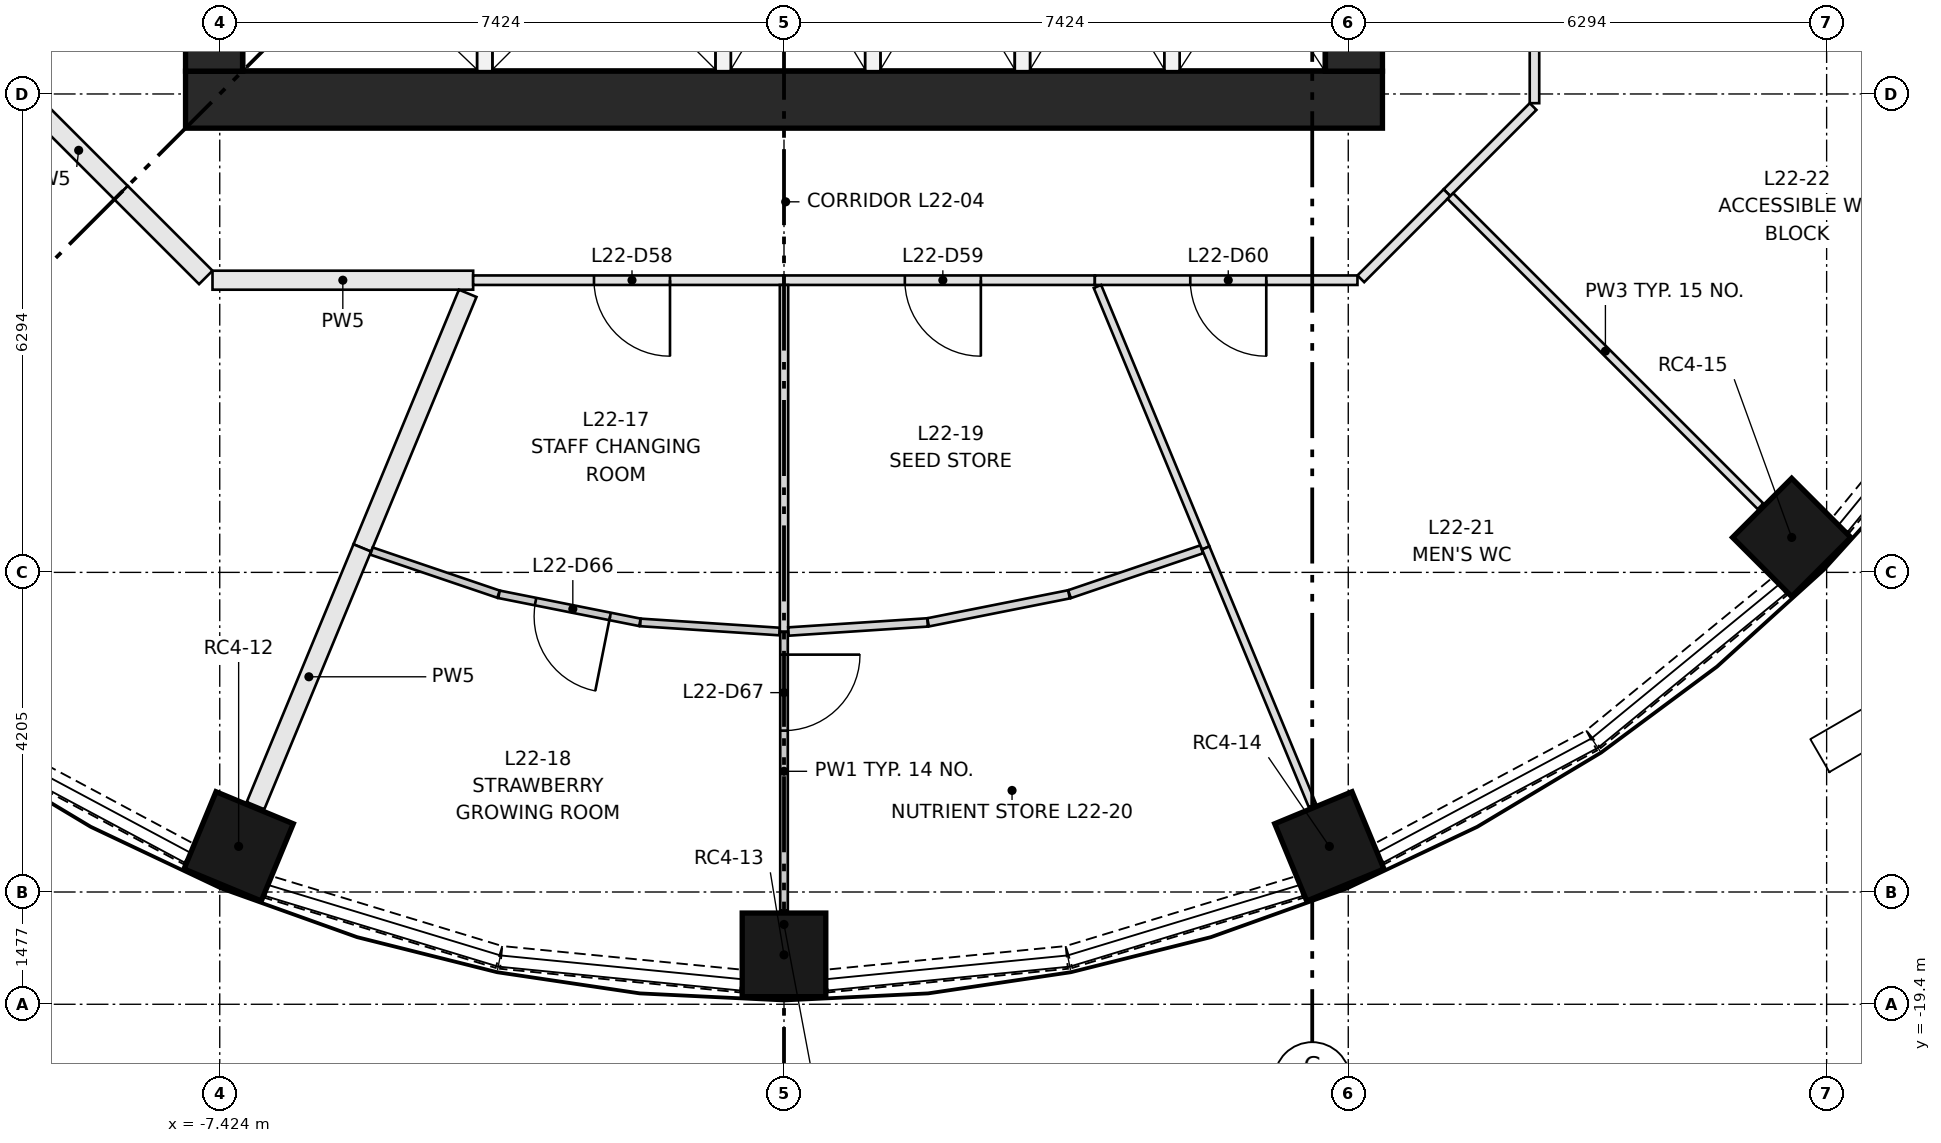
"""IFC4 building model, lengths in metres.
Left out: names, types, materials, properties, quantities, classifications, styles, units other than length and angle.
Written with IfcOpenShell. Run it as: python <this file> out.ifc"""

import sys

from ifc_helpers import new_model, si_unit, direction, frame, frame_2d, origin, origin_2d, place, context, subcontext, project, spatial, rectangle, extrude, element, fill, save


model = new_model("IFC4")
c1 = context("Model", 3, precision=1e-05, world=origin(), true_north=direction((0.0, 1.0)))
c2 = subcontext(c1, "Body", "Model", "MODEL_VIEW")
j1 = project(units=[si_unit("LENGTHUNIT", "METRE"), si_unit("PLANEANGLEUNIT", "RADIAN")], contexts=[c1])
p1 = place(None, origin())
s1 = spatial("IfcSite", under=j1, at=p1, CompositionType="ELEMENT")
p2 = place(p1, origin())
s2 = spatial("IfcBuilding", under=s1, at=p2, CompositionType="ELEMENT")
p3 = place(p2, frame((0.0, 0.0, 87.35)))
s3 = spatial("IfcBuildingStorey", under=s2, at=p3, CompositionType="ELEMENT", Elevation=87.35)
for number, where, z_axis, x_axis in (
    (1, (-7.175, -17.323, 0.0), (0.0, 0.0, 1.0), (-0.383, -0.924, 0.0)),
    (2, (0.0, -18.75, 0.0), (0.0, 0.0, 1.0), (0.0, -1.0, 0.0)),
    (3, (7.175, -17.323, 0.0), (0.0, 0.0, 1.0), (0.383, -0.924, 0.0)),
    (4, (13.258, -13.258, 0.0), (0.0, 0.0, 1.0), (0.707, -0.707, 0.0)),
):
    element("IfcColumn", number, at=place(p3, frame(where, z_axis=z_axis, x_axis=x_axis)), inside=s3, PredefinedType="COLUMN", context=c2, shape_type="SweptSolid", body=[
        extrude(rectangle(XDim=1.1, YDim=1.1, at=origin_2d()), origin(), (0.0, 0.0, 1.0), 3.65),
    ])
p4 = place(p3, frame((-7.874, -7.499, 0.0), z_axis=(0.0, 0.0, 1.0), x_axis=(1.0, 0.0, 0.0)))
e5 = element("IfcWall", 5, at=p4, inside=s3, PredefinedType="SHEAR", context=c2, shape_type="SweptSolid", body=[
    extrude(rectangle(XDim=15.748, YDim=0.75, at=frame_2d((7.874, 0.0))), origin(), (0.0, 0.0, 1.0), 3.65),
])
p5 = place(p3, frame((-7.499, -7.124, 0.0), z_axis=(0.0, 0.0, 1.0), x_axis=(0.0, 1.0, 0.0)))
e6 = element("IfcWall", 6, at=p5, inside=s3, PredefinedType="SHEAR", context=c2, shape_type="SweptSolid", body=[
    extrude(rectangle(XDim=14.248, YDim=0.75, at=frame_2d((7.124, 0.0))), origin(), (0.0, 0.0, 1.0), 3.65),
])
p6 = place(p5, frame((6.624, 0.0, 0.0)))
e7 = element("IfcOpeningElement", 7, at=p6, cuts=e6, PredefinedType="OPENING", context=c2, shape_type="SweptSolid", body=[
    extrude(rectangle(XDim=1.0, YDim=2.1, at=frame_2d((0.5, 1.05))), frame((0.0, 0.385, 0.0), z_axis=(0.0, -1.0, 0.0), x_axis=(1.0, 0.0, 0.0)), (0.0, 0.0, 1.0), 0.77),
])
p7 = place(p5, frame((3.5, 0.0, 0.0)))
e8 = element("IfcOpeningElement", 8, at=p7, cuts=e6, PredefinedType="OPENING", context=c2, shape_type="SweptSolid", body=[
    extrude(rectangle(XDim=1.8, YDim=2.1, at=frame_2d((0.9, 1.05))), frame((0.0, 0.385, 0.0), z_axis=(0.0, -1.0, 0.0), x_axis=(1.0, 0.0, 0.0)), (0.0, 0.0, 1.0), 0.77),
])
p8 = place(p5, frame((8.948, 0.0, 0.0)))
e9 = element("IfcOpeningElement", 9, at=p8, cuts=e6, PredefinedType="OPENING", context=c2, shape_type="SweptSolid", body=[
    extrude(rectangle(XDim=1.8, YDim=2.1, at=frame_2d((0.9, 1.05))), frame((0.0, 0.385, 0.0), z_axis=(0.0, -1.0, 0.0), x_axis=(1.0, 0.0, 0.0)), (0.0, 0.0, 1.0), 0.77),
])
p9 = place(p5, frame((12.124, 0.0, 0.0)))
e10 = element("IfcOpeningElement", 10, at=p9, cuts=e6, PredefinedType="OPENING", context=c2, shape_type="SweptSolid", body=[
    extrude(rectangle(XDim=1.0, YDim=2.1, at=frame_2d((0.5, 1.05))), frame((0.0, 0.385, 0.0), z_axis=(0.0, -1.0, 0.0), x_axis=(1.0, 0.0, 0.0)), (0.0, 0.0, 1.0), 0.77),
])
p10 = place(p3, frame((7.499, -7.124, 0.0), z_axis=(0.0, 0.0, 1.0), x_axis=(0.0, 1.0, 0.0)))
e11 = element("IfcWall", 11, at=p10, inside=s3, PredefinedType="SHEAR", context=c2, shape_type="SweptSolid", body=[
    extrude(rectangle(XDim=14.248, YDim=0.75, at=frame_2d((7.124, 0.0))), origin(), (0.0, 0.0, 1.0), 3.65),
])
p11 = place(p10, frame((6.624, 0.0, 0.0)))
e12 = element("IfcOpeningElement", 12, at=p11, cuts=e11, PredefinedType="OPENING", context=c2, shape_type="SweptSolid", body=[
    extrude(rectangle(XDim=1.0, YDim=2.1, at=frame_2d((0.5, 1.05))), frame((0.0, 0.385, 0.0), z_axis=(0.0, -1.0, 0.0), x_axis=(1.0, 0.0, 0.0)), (0.0, 0.0, 1.0), 0.77),
])
p12 = place(p10, frame((3.5, 0.0, 0.0)))
e13 = element("IfcOpeningElement", 13, at=p12, cuts=e11, PredefinedType="OPENING", context=c2, shape_type="SweptSolid", body=[
    extrude(rectangle(XDim=1.8, YDim=2.1, at=frame_2d((0.9, 1.05))), frame((0.0, 0.385, 0.0), z_axis=(0.0, -1.0, 0.0), x_axis=(1.0, 0.0, 0.0)), (0.0, 0.0, 1.0), 0.77),
])
p13 = place(p10, frame((8.948, 0.0, 0.0)))
e14 = element("IfcOpeningElement", 14, at=p13, cuts=e11, PredefinedType="OPENING", context=c2, shape_type="SweptSolid", body=[
    extrude(rectangle(XDim=1.8, YDim=2.1, at=frame_2d((0.9, 1.05))), frame((0.0, 0.385, 0.0), z_axis=(0.0, -1.0, 0.0), x_axis=(1.0, 0.0, 0.0)), (0.0, 0.0, 1.0), 0.77),
])
for number, where, z_axis, x_axis in (
    (15, (-3.937, -7.124, 0.0), (0.0, 0.0, 1.0), (0.0, 1.0, 0.0)),
    (16, (-0.8, -7.124, 0.0), (0.0, 0.0, 1.0), (0.0, 1.0, 0.0)),
    (17, (1.168, -7.124, 0.0), (0.0, 0.0, 1.0), (0.0, 1.0, 0.0)),
    (18, (3.137, -7.124, 0.0), (0.0, 0.0, 1.0), (0.0, 1.0, 0.0)),
    (19, (5.105, -7.124, 0.0), (0.0, 0.0, 1.0), (0.0, 1.0, 0.0)),
):
    element("IfcWall", number, at=place(p3, frame(where, z_axis=z_axis, x_axis=x_axis)), inside=s3, PredefinedType="PARTITIONING", context=c2, shape_type="SweptSolid", body=[
        extrude(rectangle(XDim=2.95, YDim=0.2, at=frame_2d((1.475, 0.0))), origin(), (0.0, 0.0, 1.0), 3.3),
    ])
p14 = place(p3, frame((-10.626, -15.929, 0.0), z_axis=(0.0, 0.0, 1.0), x_axis=(0.88188808669, -0.471458802606, 0.0)))
e20 = element("IfcWall", 20, at=p14, inside=s3, PredefinedType="SOLIDWALL", context=c2, shape_type="SweptSolid", body=[
    extrude(rectangle(XDim=3.172, YDim=0.3, at=frame_2d((1.586, 0.0))), origin(), (0.0, 0.0, 1.0), 0.9),
])
p15 = place(p3, frame((-6.787, -17.856, 0.0), z_axis=(0.0, 0.0, 1.0), x_axis=(0.956927923582, -0.290325591482, 0.0)))
e21 = element("IfcWall", 21, at=p15, inside=s3, PredefinedType="SOLIDWALL", context=c2, shape_type="SweptSolid", body=[
    extrude(rectangle(XDim=3.173, YDim=0.3, at=frame_2d((1.586, 0.0))), origin(), (0.0, 0.0, 1.0), 0.9),
])
for number, where, z_axis, x_axis in (
    (22, (-3.721, -18.783, 0.0), (0.0, 0.0, 1.0), (0.995, -0.098, 0.0)),
    (23, (0.564, -19.094, 0.0), (0.0, 0.0, 1.0), (0.995, 0.098, 0.0)),
):
    element("IfcWall", number, at=place(p3, frame(where, z_axis=z_axis, x_axis=x_axis)), inside=s3, PredefinedType="SOLIDWALL", context=c2, shape_type="SweptSolid", body=[
        extrude(rectangle(XDim=3.173, YDim=0.3, at=frame_2d((1.586, 0.0))), origin(), (0.0, 0.0, 1.0), 0.9),
    ])
p16 = place(p3, frame((3.75, -18.778, 0.0), z_axis=(0.0, 0.0, 1.0), x_axis=(0.956927923582, 0.290325591482, 0.0)))
e24 = element("IfcWall", 24, at=p16, inside=s3, PredefinedType="SOLIDWALL", context=c2, shape_type="SweptSolid", body=[
    extrude(rectangle(XDim=3.173, YDim=0.3, at=frame_2d((1.586, 0.0))), origin(), (0.0, 0.0, 1.0), 0.9),
])
p17 = place(p3, frame((7.828, -17.425, 0.0), z_axis=(0.0, 0.0, 1.0), x_axis=(0.88188808669, 0.471458802606, 0.0)))
e25 = element("IfcWall", 25, at=p17, inside=s3, PredefinedType="SOLIDWALL", context=c2, shape_type="SweptSolid", body=[
    extrude(rectangle(XDim=3.172, YDim=0.3, at=frame_2d((1.586, 0.0))), origin(), (0.0, 0.0, 1.0), 0.9),
])
for number, where, z_axis, x_axis in (
    (26, (10.651, -15.913, 0.0), (0.0, 0.0, 1.0), (0.773, 0.634, 0.0)),
    (27, (13.9, -13.104, 0.0), (0.0, 0.0, 1.0), (0.634, 0.773, 0.0)),
):
    element("IfcWall", number, at=place(p3, frame(where, z_axis=z_axis, x_axis=x_axis)), inside=s3, PredefinedType="SOLIDWALL", context=c2, shape_type="SweptSolid", body=[
        extrude(rectangle(XDim=3.173, YDim=0.3, at=frame_2d((1.586, 0.0))), origin(), (0.0, 0.0, 1.0), 0.9),
    ])
p18 = place(p3, frame((9.856, -7.589, 0.0), z_axis=(0.0, 0.0, 1.0), x_axis=(-0.70718294931, -0.707030604857, 0.0)))
e28 = element("IfcWall", 28, at=p18, inside=s3, PredefinedType="PARTITIONING", context=c2, shape_type="SweptSolid", body=[
    extrude(rectangle(XDim=1.603, YDim=0.125, at=frame_2d((0.801, 0.0))), origin(), (0.0, 0.0, 1.0), 3.3),
])
p19 = place(p3, frame((9.874, -4.09, 0.0), z_axis=(0.0, 0.0, 1.0), x_axis=(0.0, -1.0, 0.0)))
e29 = element("IfcWall", 29, at=p19, inside=s3, PredefinedType="PARTITIONING", context=c2, shape_type="SweptSolid", body=[
    extrude(rectangle(XDim=3.455, YDim=0.125, at=frame_2d((1.728, 0.0))), origin(), (0.0, 0.0, 1.0), 3.3),
])
p20 = place(p19, frame((1.2, 0.0, 0.0)))
e30 = element("IfcOpeningElement", 30, at=p20, cuts=e29, PredefinedType="OPENING", context=c2, shape_type="SweptSolid", body=[
    extrude(rectangle(XDim=1.0, YDim=2.1, at=frame_2d((0.5, 1.05))), frame((0.0, 0.073, 0.0), z_axis=(0.0, -1.0, 0.0), x_axis=(1.0, 0.0, 0.0)), (0.0, 0.0, 1.0), 0.145),
])
for number, where, z_axis, x_axis in (
    (31, (-8.722, -8.722, 0.0), (0.0, 0.0, 1.0), (-0.707, 0.707, 0.0)),
    (32, (-7.608, -9.837, 0.0), (0.0, 0.0, 1.0), (-0.707, 0.707, 0.0)),
):
    element("IfcWall", number, at=place(p3, frame(where, z_axis=z_axis, x_axis=x_axis)), inside=s3, PredefinedType="PARTITIONING", context=c2, shape_type="SweptSolid", body=[
        extrude(rectangle(XDim=1.577, YDim=0.25, at=frame_2d((0.788, 0.0))), origin(), (0.0, 0.0, 1.0), 3.3),
    ])
p21 = place(p3, frame((-4.09, -9.874, 0.0), z_axis=(0.0, 0.0, 1.0), x_axis=(-1.0, 0.0, 0.0)))
e33 = element("IfcWall", 33, at=p21, inside=s3, PredefinedType="PARTITIONING", context=c2, shape_type="SweptSolid", body=[
    extrude(rectangle(XDim=3.429, YDim=0.25, at=frame_2d((1.715, 0.0))), origin(), (0.0, 0.0, 1.0), 3.3),
])
p22 = place(p3, frame((0.0, -9.874, 0.0), z_axis=(0.0, 0.0, 1.0), x_axis=(-1.0, 0.0, 0.0)))
e34 = element("IfcWall", 34, at=p22, inside=s3, PredefinedType="PARTITIONING", context=c2, shape_type="SweptSolid", body=[
    extrude(rectangle(XDim=4.09, YDim=0.125, at=frame_2d((2.045, 0.0))), origin(), (0.0, 0.0, 1.0), 3.3),
])
p23 = place(p22, frame((1.5, 0.0, 0.0)))
e35 = element("IfcOpeningElement", 35, at=p23, cuts=e34, PredefinedType="OPENING", context=c2, shape_type="SweptSolid", body=[
    extrude(rectangle(XDim=1.0, YDim=2.1, at=frame_2d((0.5, 1.05))), frame((0.0, 0.073, 0.0), z_axis=(0.0, -1.0, 0.0), x_axis=(1.0, 0.0, 0.0)), (0.0, 0.0, 1.0), 0.145),
])
p24 = place(p3, frame((4.09, -9.874, 0.0), z_axis=(0.0, 0.0, 1.0), x_axis=(-1.0, 0.0, 0.0)))
e36 = element("IfcWall", 36, at=p24, inside=s3, PredefinedType="PARTITIONING", context=c2, shape_type="SweptSolid", body=[
    extrude(rectangle(XDim=4.09, YDim=0.125, at=frame_2d((2.045, 0.0))), origin(), (0.0, 0.0, 1.0), 3.3),
])
p25 = place(p24, frame((1.5, 0.0, 0.0)))
e37 = element("IfcOpeningElement", 37, at=p25, cuts=e36, PredefinedType="OPENING", context=c2, shape_type="SweptSolid", body=[
    extrude(rectangle(XDim=1.0, YDim=2.1, at=frame_2d((0.5, 1.05))), frame((0.0, 0.073, 0.0), z_axis=(0.0, -1.0, 0.0), x_axis=(1.0, 0.0, 0.0)), (0.0, 0.0, 1.0), 0.145),
])
p26 = place(p3, frame((7.545, -9.874, 0.0), z_axis=(0.0, 0.0, 1.0), x_axis=(-1.0, 0.0, 0.0)))
e38 = element("IfcWall", 38, at=p26, inside=s3, PredefinedType="PARTITIONING", context=c2, shape_type="SweptSolid", body=[
    extrude(rectangle(XDim=3.455, YDim=0.125, at=frame_2d((1.728, 0.0))), origin(), (0.0, 0.0, 1.0), 3.3),
])
p27 = place(p26, frame((1.2, 0.0, 0.0)))
e39 = element("IfcOpeningElement", 39, at=p27, cuts=e38, PredefinedType="OPENING", context=c2, shape_type="SweptSolid", body=[
    extrude(rectangle(XDim=1.0, YDim=2.1, at=frame_2d((0.5, 1.05))), frame((0.0, 0.073, 0.0), z_axis=(0.0, -1.0, 0.0), x_axis=(1.0, 0.0, 0.0)), (0.0, 0.0, 1.0), 0.145),
])
p28 = place(p3, frame((8.722, -8.722, 0.0), z_axis=(0.0, 0.0, 1.0), x_axis=(-0.707030604857, -0.70718294931, 0.0)))
e40 = element("IfcWall", 40, at=p28, inside=s3, PredefinedType="PARTITIONING", context=c2, shape_type="SweptSolid", body=[
    extrude(rectangle(XDim=1.603, YDim=0.125, at=frame_2d((0.801, 0.0))), origin(), (0.0, 0.0, 1.0), 3.3),
])
p29 = place(p3, frame((-4.162, -10.047, 0.0), z_axis=(0.0, 0.0, 1.0), x_axis=(-0.382649180879, -0.923893719197, 0.0)))
e41 = element("IfcWall", 41, at=p29, inside=s3, PredefinedType="PARTITIONING", context=c2, shape_type="SweptSolid", body=[
    extrude(rectangle(XDim=3.625, YDim=0.25, at=frame_2d((1.812, 0.0))), origin(), (0.0, 0.0, 1.0), 3.3),
])
p30 = place(p3, frame((-5.549, -13.396, 0.0), z_axis=(0.0, 0.0, 1.0), x_axis=(-0.382706260748, -0.923870076355, 0.0)))
e42 = element("IfcWall", 42, at=p30, inside=s3, PredefinedType="PARTITIONING", context=c2, shape_type="SweptSolid", body=[
    extrude(rectangle(XDim=3.67, YDim=0.25, at=frame_2d((1.835, 0.0))), origin(), (0.0, 0.0, 1.0), 3.3),
])
p31 = place(p3, frame((-3.756, -14.005, 0.0), z_axis=(0.0, 0.0, 1.0), x_axis=(-0.946911786272, 0.321493497633, 0.0)))
e43 = element("IfcWall", 43, at=p31, inside=s3, PredefinedType="PARTITIONING", context=c2, shape_type="SweptSolid", body=[
    extrude(rectangle(XDim=1.765, YDim=0.1, at=frame_2d((0.882, 0.0))), origin(), (0.0, 0.0, 1.0), 3.3),
])
p32 = place(p3, frame((-1.896, -14.375, 0.0), z_axis=(0.0, 0.0, 1.0), x_axis=(-0.980773924018, 0.19514740574, 0.0)))
e44 = element("IfcWall", 44, at=p32, inside=s3, PredefinedType="PARTITIONING", context=c2, shape_type="SweptSolid", body=[
    extrude(rectangle(XDim=1.89, YDim=0.1, at=frame_2d((0.945, 0.0))), origin(), (0.0, 0.0, 1.0), 3.3),
])
p33 = place(p32, frame((0.4, 0.0, 0.0)))
e45 = element("IfcOpeningElement", 45, at=p33, cuts=e44, PredefinedType="OPENING", context=c2, shape_type="SweptSolid", body=[
    extrude(rectangle(XDim=1.0, YDim=2.1, at=frame_2d((0.5, 1.05))), frame((0.0, 0.06, 0.0), z_axis=(0.0, -1.0, 0.0), x_axis=(1.0, 0.0, 0.0)), (0.0, 0.0, 1.0), 0.12),
])
p34 = place(p3, frame((-0.058, -14.496, 0.0), z_axis=(0.0, 0.0, 1.0), x_axis=(-0.99786392157, 0.065326824732, 0.0)))
e46 = element("IfcWall", 46, at=p34, inside=s3, PredefinedType="PARTITIONING", context=c2, shape_type="SweptSolid", body=[
    extrude(rectangle(XDim=1.835, YDim=0.1, at=frame_2d((0.917, 0.0))), origin(), (0.0, 0.0, 1.0), 3.3),
])
p35 = place(p3, frame((0.0, -9.937, 0.0), z_axis=(0.0, 0.0, 1.0), x_axis=(0.0, -1.0, 0.0)))
e47 = element("IfcWall", 47, at=p35, inside=s3, PredefinedType="PARTITIONING", context=c2, shape_type="SweptSolid", body=[
    extrude(rectangle(XDim=4.563, YDim=0.11, at=frame_2d((2.282, 0.0))), origin(), (0.0, 0.0, 1.0), 3.3),
])
p36 = place(p3, frame((0.0, -14.5, 0.0), z_axis=(0.0, 0.0, 1.0), x_axis=(0.0, -1.0, 0.0)))
e48 = element("IfcWall", 48, at=p36, inside=s3, PredefinedType="PARTITIONING", context=c2, shape_type="SweptSolid", body=[
    extrude(rectangle(XDim=3.67, YDim=0.1, at=frame_2d((1.835, 0.0))), origin(), (0.0, 0.0, 1.0), 3.3),
])
p37 = place(p36, frame((0.3, 0.0, 0.0)))
e49 = element("IfcOpeningElement", 49, at=p37, cuts=e48, PredefinedType="OPENING", context=c2, shape_type="SweptSolid", body=[
    extrude(rectangle(XDim=1.0, YDim=2.1, at=frame_2d((0.5, 1.05))), frame((0.0, 0.06, 0.0), z_axis=(0.0, -1.0, 0.0), x_axis=(1.0, 0.0, 0.0)), (0.0, 0.0, 1.0), 0.12),
])
p38 = place(p3, frame((1.889, -14.376, 0.0), z_axis=(0.0, 0.0, 1.0), x_axis=(-0.99786221716, -0.065352854292, 0.0)))
e50 = element("IfcWall", 50, at=p38, inside=s3, PredefinedType="PARTITIONING", context=c2, shape_type="SweptSolid", body=[
    extrude(rectangle(XDim=1.834, YDim=0.11, at=frame_2d((0.917, 0.0))), origin(), (0.0, 0.0, 1.0), 3.3),
])
p39 = place(p3, frame((3.75, -14.007, 0.0), z_axis=(0.0, 0.0, 1.0), x_axis=(-0.980788807459, -0.195072589471, 0.0)))
e51 = element("IfcWall", 51, at=p39, inside=s3, PredefinedType="PARTITIONING", context=c2, shape_type="SweptSolid", body=[
    extrude(rectangle(XDim=1.89, YDim=0.11, at=frame_2d((0.945, 0.0))), origin(), (0.0, 0.0, 1.0), 3.3),
])
p40 = place(p3, frame((5.496, -13.414, 0.0), z_axis=(0.0, 0.0, 1.0), x_axis=(-0.946941139485, -0.321407029095, 0.0)))
e52 = element("IfcWall", 52, at=p40, inside=s3, PredefinedType="PARTITIONING", context=c2, shape_type="SweptSolid", body=[
    extrude(rectangle(XDim=1.837, YDim=0.11, at=frame_2d((0.918, 0.0))), origin(), (0.0, 0.0, 1.0), 3.3),
])
p41 = place(p3, frame((4.124, -9.957, 0.0), z_axis=(0.0, 0.0, 1.0), x_axis=(0.382691554869, -0.923876168018, 0.0)))
e53 = element("IfcWall", 53, at=p41, inside=s3, PredefinedType="PARTITIONING", context=c2, shape_type="SweptSolid", body=[
    extrude(rectangle(XDim=3.723, YDim=0.105, at=frame_2d((1.862, 0.0))), origin(), (0.0, 0.0, 1.0), 3.3),
])
p42 = place(p3, frame((5.549, -13.396, 0.0), z_axis=(0.0, 0.0, 1.0), x_axis=(0.382706260748, -0.923870076355, 0.0)))
e54 = element("IfcWall", 54, at=p42, inside=s3, PredefinedType="PARTITIONING", context=c2, shape_type="SweptSolid", body=[
    extrude(rectangle(XDim=3.67, YDim=0.105, at=frame_2d((1.835, 0.0))), origin(), (0.0, 0.0, 1.0), 3.3),
])
p43 = place(p3, frame((8.767, -8.767, 0.0), z_axis=(0.0, 0.0, 1.0), x_axis=(0.707106781187, -0.707106781187, 0.0)))
e55 = element("IfcWall", 55, at=p43, inside=s3, PredefinedType="PARTITIONING", context=c2, shape_type="SweptSolid", body=[
    extrude(rectangle(XDim=5.772, YDim=0.105, at=frame_2d((2.886, 0.0))), origin(), (0.0, 0.0, 1.0), 3.3),
])
p44 = place(p3, frame((14.043, -5.817, 0.0), z_axis=(0.0, 0.0, 1.0), x_axis=(0.923889594764, -0.382659139036, 0.0)))
e56 = element("IfcWall", 56, at=p44, inside=s3, PredefinedType="PARTITIONING", context=c2, shape_type="SweptSolid", body=[
    extrude(rectangle(XDim=2.97, YDim=0.105, at=frame_2d((1.485, 0.0))), origin(), (0.0, 0.0, 1.0), 3.3),
])
p45 = place(p23, origin())
e57 = element("IfcDoor", 57, at=p45, inside=s3, OperationType="SINGLE_SWING_LEFT", PredefinedType="DOOR", context=c2, shape_type="SweptSolid", body=[
    extrude(rectangle(XDim=1.0, YDim=2.1, at=frame_2d((0.5, 1.05))), frame((0.0, 0.025, 0.0), z_axis=(0.0, -1.0, 0.0), x_axis=(1.0, 0.0, 0.0)), (0.0, 0.0, 1.0), 0.05),
])
fill(e35, e57)
p46 = place(p25, origin())
e58 = element("IfcDoor", 58, at=p46, inside=s3, OperationType="SINGLE_SWING_LEFT", PredefinedType="DOOR", context=c2, shape_type="SweptSolid", body=[
    extrude(rectangle(XDim=1.0, YDim=2.1, at=frame_2d((0.5, 1.05))), frame((0.0, 0.025, 0.0), z_axis=(0.0, -1.0, 0.0), x_axis=(1.0, 0.0, 0.0)), (0.0, 0.0, 1.0), 0.05),
])
fill(e37, e58)
p47 = place(p27, origin())
e59 = element("IfcDoor", 59, at=p47, inside=s3, OperationType="SINGLE_SWING_LEFT", PredefinedType="DOOR", context=c2, shape_type="SweptSolid", body=[
    extrude(rectangle(XDim=1.0, YDim=2.1, at=frame_2d((0.5, 1.05))), frame((0.0, 0.025, 0.0), z_axis=(0.0, -1.0, 0.0), x_axis=(1.0, 0.0, 0.0)), (0.0, 0.0, 1.0), 0.05),
])
fill(e39, e59)
p48 = place(p33, origin())
e60 = element("IfcDoor", 60, at=p48, inside=s3, OperationType="SINGLE_SWING_LEFT", PredefinedType="DOOR", context=c2, shape_type="SweptSolid", body=[
    extrude(rectangle(XDim=1.0, YDim=2.1, at=frame_2d((0.5, 1.05))), frame((0.0, 0.025, 0.0), z_axis=(0.0, -1.0, 0.0), x_axis=(1.0, 0.0, 0.0)), (0.0, 0.0, 1.0), 0.05),
])
fill(e45, e60)
p49 = place(p37, origin())
e61 = element("IfcDoor", 61, at=p49, inside=s3, OperationType="SINGLE_SWING_LEFT", PredefinedType="DOOR", context=c2, shape_type="SweptSolid", body=[
    extrude(rectangle(XDim=1.0, YDim=2.1, at=frame_2d((0.5, 1.05))), frame((0.0, 0.025, 0.0), z_axis=(0.0, -1.0, 0.0), x_axis=(1.0, 0.0, 0.0)), (0.0, 0.0, 1.0), 0.05),
])
fill(e49, e61)
save(model, sys.argv[1])
